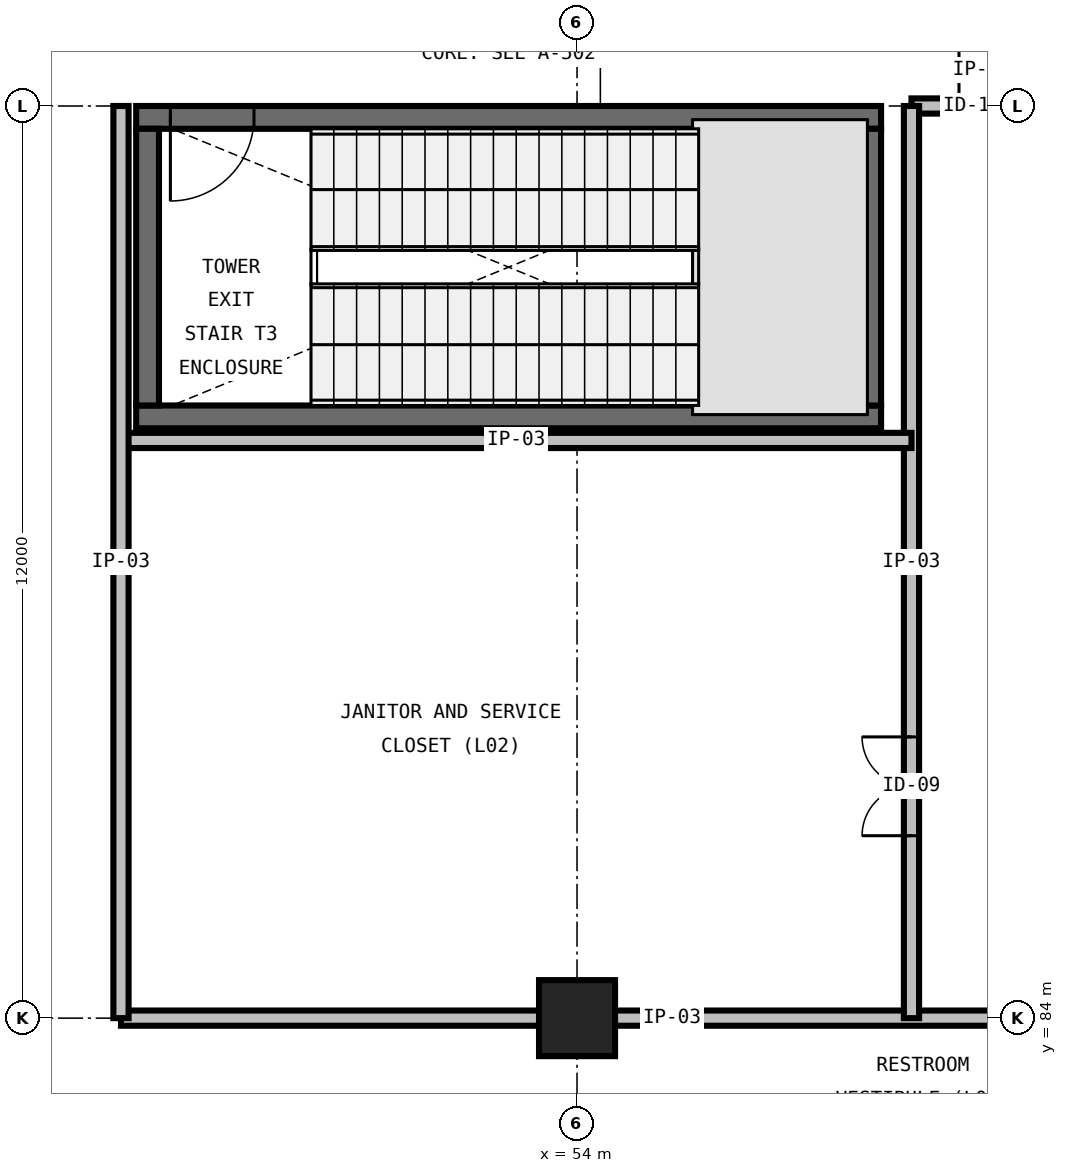
"""IFC4 building model, lengths in metres.
Left out: names, types, materials, properties, quantities, classifications, styles, units other than length and angle.
Written with IfcOpenShell. Run it as: python <this file> out.ifc"""

import sys

from ifc_helpers import new_model, si_unit, direction, frame, frame_2d, origin, origin_2d, place, context, subcontext, project, spatial, rectangle, extrude, element, fill, save


model = new_model("IFC4")
c1 = context("Model", 3, precision=1e-05, world=origin(), true_north=direction((0.0, 1.0)))
c2 = subcontext(c1, "Body", "Model", "MODEL_VIEW")
j1 = project(units=[si_unit("LENGTHUNIT", "METRE"), si_unit("PLANEANGLEUNIT", "RADIAN")], contexts=[c1])
p1 = place(None, origin())
s1 = spatial("IfcSite", under=j1, at=p1, CompositionType="ELEMENT")
p2 = place(p1, origin())
s2 = spatial("IfcBuilding", under=s1, at=p2, CompositionType="ELEMENT")
p3 = place(p2, frame((0.0, 0.0, 12.0)))
s3 = spatial("IfcBuildingStorey", under=s2, at=p3, CompositionType="ELEMENT", Elevation=12.0)
p4 = place(p3, frame((54.0, 84.0, 0.0), z_axis=(0.0, 0.0, 1.0), x_axis=(1.0, 0.0, 0.0)))
e1 = element("IfcColumn", 1, at=p4, inside=s3, PredefinedType="COLUMN", context=c2, shape_type="SweptSolid", body=[
    extrude(rectangle(XDim=1.0, YDim=1.0, at=origin_2d()), origin(), (0.0, 0.0, 1.0), 6.0),
])
p5 = place(p3, frame((48.2, 91.91, 0.0), z_axis=(0.0, 0.0, 1.0), x_axis=(1.0, 0.0, 0.0)))
e2 = element("IfcWall", 2, at=p5, inside=s3, PredefinedType="SHEAR", context=c2, shape_type="SweptSolid", body=[
    extrude(rectangle(XDim=9.8, YDim=0.3, at=frame_2d((4.9, 0.0))), origin(), (0.0, 0.0, 1.0), 6.0),
])
p6 = place(p3, frame((58.0, 95.85, 0.0), z_axis=(0.0, 0.0, 1.0), x_axis=(-1.0, 0.0, 0.0)))
e3 = element("IfcWall", 3, at=p6, inside=s3, PredefinedType="SHEAR", context=c2, shape_type="SweptSolid", body=[
    extrude(rectangle(XDim=9.8, YDim=0.3, at=frame_2d((4.9, 0.0))), origin(), (0.0, 0.0, 1.0), 6.0),
])
p7 = place(p6, frame((8.25, 0.0, 0.0)))
e4 = element("IfcOpeningElement", 4, at=p7, cuts=e3, PredefinedType="OPENING", context=c2, shape_type="SweptSolid", body=[
    extrude(rectangle(XDim=1.1, YDim=2.2, at=frame_2d((0.55, 1.1))), frame((0.0, 0.165, 0.0), z_axis=(0.0, -1.0, 0.0), x_axis=(1.0, 0.0, 0.0)), (0.0, 0.0, 1.0), 0.33),
])
for number, where, z_axis, x_axis in (
    (5, (48.35, 95.7, 0.0), (0.0, 0.0, 1.0), (0.0, -1.0, 0.0)),
    (6, (57.85, 92.06, 0.0), (0.0, 0.0, 1.0), (0.0, 1.0, 0.0)),
):
    element("IfcWall", number, at=place(p3, frame(where, z_axis=z_axis, x_axis=x_axis)), inside=s3, PredefinedType="SHEAR", context=c2, shape_type="SweptSolid", body=[
        extrude(rectangle(XDim=3.64, YDim=0.3, at=frame_2d((1.82, 0.0))), origin(), (0.0, 0.0, 1.0), 6.0),
    ])
p8 = place(p3, frame((48.0, 84.0, 0.0), z_axis=(0.0, 0.0, 1.0), x_axis=(1.0, 0.0, 0.0)))
e7 = element("IfcWall", 7, at=p8, inside=s3, PredefinedType="PARTITIONING", context=c2, shape_type="SweptSolid", body=[
    extrude(rectangle(XDim=18.0, YDim=0.2, at=frame_2d((9.0, 0.0))), origin(), (0.0, 0.0, 1.0), 4.872),
])
p9 = place(p3, frame((58.4, 96.0, 0.0), z_axis=(0.0, 0.0, 1.0), x_axis=(1.0, 0.0, 0.0)))
e8 = element("IfcWall", 8, at=p9, inside=s3, PredefinedType="PARTITIONING", context=c2, shape_type="SweptSolid", body=[
    extrude(rectangle(XDim=2.4, YDim=0.2, at=frame_2d((1.2, 0.0))), origin(), (0.0, 0.0, 1.0), 4.719),
])
p10 = place(p9, frame((0.625, 0.0, 0.0)))
e9 = element("IfcOpeningElement", 9, at=p10, cuts=e8, PredefinedType="OPENING", context=c2, shape_type="SweptSolid", body=[
    extrude(rectangle(XDim=0.95, YDim=2.15, at=frame_2d((0.475, 1.075))), frame((0.0, 0.115, 0.0), z_axis=(0.0, -1.0, 0.0), x_axis=(1.0, 0.0, 0.0)), (0.0, 0.0, 1.0), 0.23),
])
p11 = place(p3, frame((58.4, 84.0, 0.0), z_axis=(0.0, 0.0, 1.0), x_axis=(0.0, 1.0, 0.0)))
e10 = element("IfcWall", 10, at=p11, inside=s3, PredefinedType="PARTITIONING", context=c2, shape_type="SweptSolid", body=[
    extrude(rectangle(XDim=12.0, YDim=0.2, at=frame_2d((6.0, 0.0))), origin(), (0.0, 0.0, 1.0), 5.65),
])
p12 = place(p11, frame((2.4, 0.0, 0.0)))
e11 = element("IfcOpeningElement", 11, at=p12, cuts=e10, PredefinedType="OPENING", context=c2, shape_type="SweptSolid", body=[
    extrude(rectangle(XDim=1.3, YDim=2.2, at=frame_2d((0.65, 1.1))), frame((0.0, 0.115, 0.0), z_axis=(0.0, -1.0, 0.0), x_axis=(1.0, 0.0, 0.0)), (0.0, 0.0, 1.0), 0.23),
])
p13 = place(p3, frame((48.0, 91.6, 0.0), z_axis=(0.0, 0.0, 1.0), x_axis=(1.0, 0.0, 0.0)))
e12 = element("IfcWall", 12, at=p13, inside=s3, PredefinedType="PARTITIONING", context=c2, shape_type="SweptSolid", body=[
    extrude(rectangle(XDim=10.4, YDim=0.2, at=frame_2d((5.2, 0.0))), origin(), (0.0, 0.0, 1.0), 5.65),
])
p14 = place(p3, frame((48.0, 84.0, 0.0), z_axis=(0.0, 0.0, 1.0), x_axis=(0.0, 1.0, 0.0)))
e13 = element("IfcWall", 13, at=p14, inside=s3, PredefinedType="PARTITIONING", context=c2, shape_type="SweptSolid", body=[
    extrude(rectangle(XDim=12.0, YDim=0.2, at=frame_2d((6.0, 0.0))), origin(), (0.0, 0.0, 1.0), 5.65),
])
p15 = place(p7, origin())
e14 = element("IfcDoor", 14, at=p15, inside=s3, OperationType="SINGLE_SWING_RIGHT", PredefinedType="DOOR", context=c2, shape_type="SweptSolid", body=[
    extrude(rectangle(XDim=1.1, YDim=2.2, at=frame_2d((0.55, 1.1))), frame((0.0, 0.025, 0.0), z_axis=(0.0, -1.0, 0.0), x_axis=(1.0, 0.0, 0.0)), (0.0, 0.0, 1.0), 0.05),
])
fill(e4, e14)
p16 = place(p10, origin())
e15 = element("IfcDoor", 15, at=p16, inside=s3, OperationType="SINGLE_SWING_LEFT", PredefinedType="DOOR", context=c2, shape_type="SweptSolid", body=[
    extrude(rectangle(XDim=0.95, YDim=2.15, at=frame_2d((0.475, 1.075))), frame((0.0, 0.025, 0.0), z_axis=(0.0, -1.0, 0.0), x_axis=(1.0, 0.0, 0.0)), (0.0, 0.0, 1.0), 0.05),
])
fill(e9, e15)
p17 = place(p12, origin())
e16 = element("IfcDoor", 16, at=p17, inside=s3, OperationType="DOUBLE_DOOR_SINGLE_SWING", PredefinedType="DOOR", context=c2, shape_type="SweptSolid", body=[
    extrude(rectangle(XDim=1.3, YDim=2.2, at=frame_2d((0.65, 1.1))), frame((0.0, 0.025, 0.0), z_axis=(0.0, -1.0, 0.0), x_axis=(1.0, 0.0, 0.0)), (0.0, 0.0, 1.0), 0.05),
])
fill(e11, e16)
save(model, sys.argv[1])
